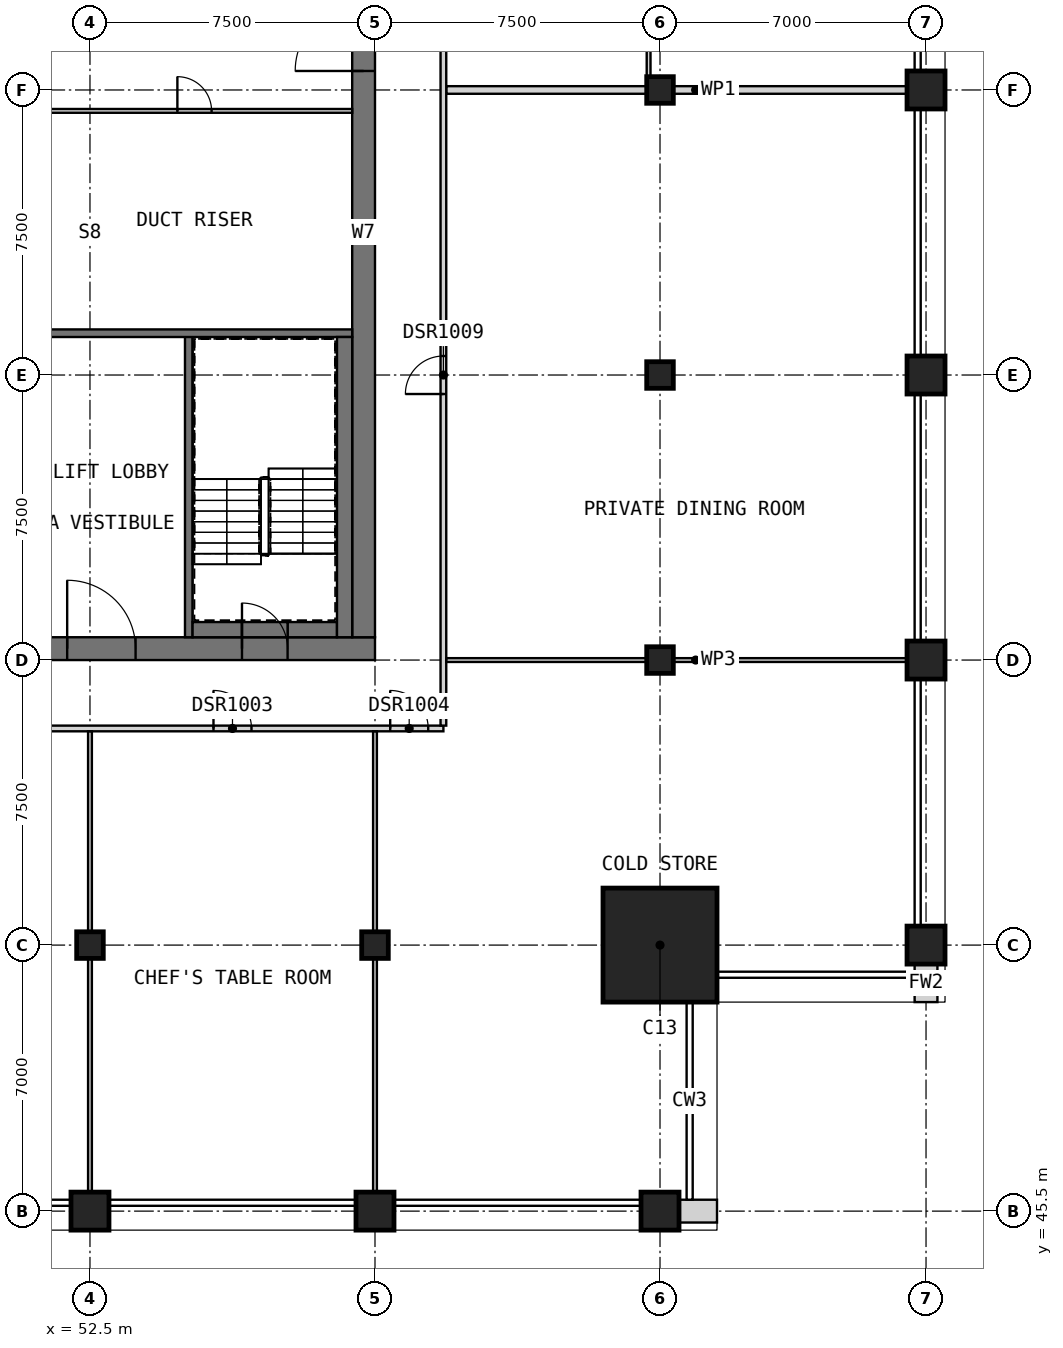
"""IFC4 building model, lengths in metres.
Left out: names, types, materials, properties, quantities, classifications, styles, units other than length and angle.
Written with IfcOpenShell. Run it as: python <this file> out.ifc"""

import sys

from ifc_helpers import new_model, si_unit, direction, frame, frame_2d, origin, origin_2d, place, context, subcontext, project, spatial, rectangle, extrude, element, fill, save


model = new_model("IFC4")
c1 = context("Model", 3, precision=1e-05, world=origin(), true_north=direction((0.0, 1.0)))
c2 = subcontext(c1, "Body", "Model", "MODEL_VIEW")
j1 = project(units=[si_unit("LENGTHUNIT", "METRE"), si_unit("PLANEANGLEUNIT", "RADIAN")], contexts=[c1])
p1 = place(None, origin())
s1 = spatial("IfcSite", under=j1, at=p1, CompositionType="ELEMENT")
p2 = place(p1, origin())
s2 = spatial("IfcBuilding", under=s1, at=p2, CompositionType="ELEMENT")
p3 = place(p2, frame((0.0, 0.0, 292.2)))
s3 = spatial("IfcBuildingStorey", under=s2, at=p3, CompositionType="ELEMENT", Elevation=292.2)
p4 = place(p3, frame((52.5, 45.5, 0.0), z_axis=(0.0, 0.0, 1.0), x_axis=(1.0, 0.0, 0.0)))
e1 = element("IfcColumn", 1, at=p4, inside=s3, PredefinedType="COLUMN", context=c2, shape_type="SweptSolid", body=[
    extrude(rectangle(XDim=1.0, YDim=1.0, at=origin_2d()), origin(), (0.0, 0.0, 1.0), 5.5),
])
p5 = place(p3, frame((52.5, 52.5, 0.0), z_axis=(0.0, 0.0, 1.0), x_axis=(1.0, 0.0, 0.0)))
e2 = element("IfcColumn", 2, at=p5, inside=s3, PredefinedType="COLUMN", context=c2, shape_type="SweptSolid", body=[
    extrude(rectangle(XDim=0.7, YDim=0.7, at=origin_2d()), origin(), (0.0, 0.0, 1.0), 5.5),
])
p6 = place(p3, frame((60.0, 45.5, 0.0), z_axis=(0.0, 0.0, 1.0), x_axis=(1.0, 0.0, 0.0)))
e3 = element("IfcColumn", 3, at=p6, inside=s3, PredefinedType="COLUMN", context=c2, shape_type="SweptSolid", body=[
    extrude(rectangle(XDim=1.0, YDim=1.0, at=origin_2d()), origin(), (0.0, 0.0, 1.0), 5.5),
])
p7 = place(p3, frame((60.0, 52.5, 0.0), z_axis=(0.0, 0.0, 1.0), x_axis=(1.0, 0.0, 0.0)))
e4 = element("IfcColumn", 4, at=p7, inside=s3, PredefinedType="COLUMN", context=c2, shape_type="SweptSolid", body=[
    extrude(rectangle(XDim=0.7, YDim=0.7, at=origin_2d()), origin(), (0.0, 0.0, 1.0), 5.5),
])
p8 = place(p3, frame((67.5, 45.5, 0.0), z_axis=(0.0, 0.0, 1.0), x_axis=(1.0, 0.0, 0.0)))
e5 = element("IfcColumn", 5, at=p8, inside=s3, PredefinedType="COLUMN", context=c2, shape_type="SweptSolid", body=[
    extrude(rectangle(XDim=1.0, YDim=1.0, at=origin_2d()), origin(), (0.0, 0.0, 1.0), 5.5),
])
for number, where, z_axis, x_axis in (
    (6, (67.5, 60.0, 0.0), (0.0, 0.0, 1.0), (1.0, 0.0, 0.0)),
    (7, (67.5, 67.5, 0.0), (0.0, 0.0, 1.0), (1.0, 0.0, 0.0)),
    (8, (67.5, 75.0, 0.0), (0.0, 0.0, 1.0), (1.0, 0.0, 0.0)),
):
    element("IfcColumn", number, at=place(p3, frame(where, z_axis=z_axis, x_axis=x_axis)), inside=s3, PredefinedType="COLUMN", context=c2, shape_type="SweptSolid", body=[
        extrude(rectangle(XDim=0.7, YDim=0.7, at=origin_2d()), origin(), (0.0, 0.0, 1.0), 5.5),
    ])
for number, where, z_axis, x_axis in (
    (9, (74.5, 52.5, 0.0), (0.0, 0.0, 1.0), (1.0, 0.0, 0.0)),
    (10, (74.5, 60.0, 0.0), (0.0, 0.0, 1.0), (1.0, 0.0, 0.0)),
    (11, (74.5, 67.5, 0.0), (0.0, 0.0, 1.0), (1.0, 0.0, 0.0)),
    (12, (74.5, 75.0, 0.0), (0.0, 0.0, 1.0), (1.0, 0.0, 0.0)),
):
    element("IfcColumn", number, at=place(p3, frame(where, z_axis=z_axis, x_axis=x_axis)), inside=s3, PredefinedType="COLUMN", context=c2, shape_type="SweptSolid", body=[
        extrude(rectangle(XDim=1.0, YDim=1.0, at=origin_2d()), origin(), (0.0, 0.0, 1.0), 5.5),
    ])
p9 = place(p3, frame((67.5, 52.5, 0.0), z_axis=(0.0, 0.0, 1.0), x_axis=(1.0, 0.0, 0.0)))
e13 = element("IfcColumn", 13, at=p9, inside=s3, PredefinedType="COLUMN", context=c2, shape_type="SweptSolid", body=[
    extrude(rectangle(XDim=3.0, YDim=3.0, at=origin_2d()), origin(), (0.0, 0.0, 1.0), 5.5),
])
p10 = place(p3, frame((30.0, 60.3, 0.0), z_axis=(0.0, 0.0, 1.0), x_axis=(1.0, 0.0, 0.0)))
e14 = element("IfcWall", 14, at=p10, inside=s3, PredefinedType="SHEAR", context=c2, shape_type="SweptSolid", body=[
    extrude(rectangle(XDim=30.0, YDim=0.6, at=frame_2d((15.0, 0.0))), origin(), (0.0, 0.0, 1.0), 5.5),
])
p11 = place(p10, frame((21.9, 0.0, 0.0)))
e15 = element("IfcOpeningElement", 15, at=p11, cuts=e14, PredefinedType="OPENING", context=c2, shape_type="SweptSolid", body=[
    extrude(rectangle(XDim=1.8, YDim=2.1, at=frame_2d((0.9, 1.05))), frame((0.0, 0.31, 0.0), z_axis=(0.0, -1.0, 0.0), x_axis=(1.0, 0.0, 0.0)), (0.0, 0.0, 1.0), 0.62),
])
p12 = place(p10, frame((26.5, 0.0, 0.0)))
e16 = element("IfcOpeningElement", 16, at=p12, cuts=e14, PredefinedType="OPENING", context=c2, shape_type="SweptSolid", body=[
    extrude(rectangle(XDim=1.2, YDim=2.1, at=frame_2d((0.6, 1.05))), frame((0.0, 0.31, 0.0), z_axis=(0.0, -1.0, 0.0), x_axis=(1.0, 0.0, 0.0)), (0.0, 0.0, 1.0), 0.62),
])
p13 = place(p3, frame((59.7, 60.6, 0.0), z_axis=(0.0, 0.0, 1.0), x_axis=(0.0, 1.0, 0.0)))
e17 = element("IfcWall", 17, at=p13, inside=s3, PredefinedType="SHEAR", context=c2, shape_type="SweptSolid", body=[
    extrude(rectangle(XDim=21.3, YDim=0.6, at=frame_2d((10.65, 0.0))), origin(), (0.0, 0.0, 1.0), 5.5),
])
p14 = place(p13, frame((14.9, 0.0, 0.0)))
e18 = element("IfcOpeningElement", 18, at=p14, cuts=e17, PredefinedType="OPENING", context=c2, shape_type="SweptSolid", body=[
    extrude(rectangle(XDim=1.8, YDim=2.1, at=frame_2d((0.9, 1.05))), frame((0.0, 0.31, 0.0), z_axis=(0.0, -1.0, 0.0), x_axis=(1.0, 0.0, 0.0)), (0.0, 0.0, 1.0), 0.62),
])
for number, where, z_axis, x_axis in (
    (19, (68.0, 45.5, 0.0), (0.0, 0.0, 1.0), (1.0, 0.0, 0.0)),
    (20, (74.5, 51.0, 0.0), (0.0, 0.0, 1.0), (0.0, 1.0, 0.0)),
):
    element("IfcWall", number, at=place(p3, frame(where, z_axis=z_axis, x_axis=x_axis)), inside=s3, PredefinedType="SOLIDWALL", context=c2, shape_type="SweptSolid", body=[
        extrude(rectangle(XDim=1.0, YDim=0.6, at=frame_2d((0.5, 0.0))), origin(), (0.0, 0.0, 1.0), 5.2),
    ])
p15 = place(p3, frame((55.1, 60.6, 0.0), z_axis=(0.0, 0.0, 1.0), x_axis=(0.0, 1.0, 0.0)))
e21 = element("IfcWall", 21, at=p15, inside=s3, PredefinedType="SOLIDWALL", context=c2, shape_type="SweptSolid", body=[
    extrude(rectangle(XDim=8.0, YDim=0.2, at=frame_2d((4.0, 0.0))), origin(), (0.0, 0.0, 1.0), 5.2),
])
p16 = place(p3, frame((51.1, 68.6, 0.0), z_axis=(0.0, 0.0, 1.0), x_axis=(1.0, 0.0, 0.0)))
e22 = element("IfcWall", 22, at=p16, inside=s3, PredefinedType="SOLIDWALL", context=c2, shape_type="SweptSolid", body=[
    extrude(rectangle(XDim=8.3, YDim=0.2, at=frame_2d((4.15, 0.0))), origin(), (0.0, 0.0, 1.0), 5.2),
])
for number, where, z_axis, x_axis in (
    (23, (55.2, 60.8, 0.0), (0.0, 0.0, 1.0), (1.0, 0.0, 0.0)),
    (24, (57.7, 60.8, 0.0), (0.0, 0.0, 1.0), (1.0, 0.0, 0.0)),
):
    element("IfcWall", number, at=place(p3, frame(where, z_axis=z_axis, x_axis=x_axis)), inside=s3, PredefinedType="SOLIDWALL", context=c2, shape_type="SweptSolid", body=[
        extrude(rectangle(XDim=1.3, YDim=0.4, at=frame_2d((0.65, 0.0))), origin(), (0.0, 0.0, 1.0), 5.2),
    ])
p17 = place(p3, frame((59.2, 60.6, 0.0), z_axis=(0.0, 0.0, 1.0), x_axis=(0.0, 1.0, 0.0)))
e25 = element("IfcWall", 25, at=p17, inside=s3, PredefinedType="SOLIDWALL", context=c2, shape_type="SweptSolid", body=[
    extrude(rectangle(XDim=7.9, YDim=0.4, at=frame_2d((3.95, 0.0))), origin(), (0.0, 0.0, 1.0), 5.2),
])
p18 = place(p3, frame((56.5, 60.8, 3.2), z_axis=(0.0, 0.0, 1.0), x_axis=(1.0, 0.0, 0.0)))
e26 = element("IfcWall", 26, at=p18, inside=s3, PredefinedType="SOLIDWALL", context=c2, shape_type="SweptSolid", body=[
    extrude(rectangle(XDim=1.2, YDim=0.4, at=frame_2d((0.6, 0.0))), origin(), (0.0, 0.0, 1.0), 2.0),
])
p19 = place(p3, frame((51.1, 74.45, 0.0), z_axis=(0.0, 0.0, 1.0), x_axis=(1.0, 0.0, 0.0)))
e27 = element("IfcWall", 27, at=p19, inside=s3, PredefinedType="PARTITIONING", context=c2, shape_type="SweptSolid", body=[
    extrude(rectangle(XDim=8.3, YDim=0.1, at=frame_2d((4.15, 0.0))), origin(), (0.0, 0.0, 1.0), 5.2),
])
p20 = place(p19, frame((3.7, 0.0, 0.0)))
e28 = element("IfcOpeningElement", 28, at=p20, cuts=e27, PredefinedType="OPENING", context=c2, shape_type="SweptSolid", body=[
    extrude(rectangle(XDim=0.9, YDim=2.1, at=frame_2d((0.45, 1.05))), frame((0.0, 0.06, 0.0), z_axis=(0.0, -1.0, 0.0), x_axis=(1.0, 0.0, 0.0)), (0.0, 0.0, 1.0), 0.12),
])
p21 = place(p3, frame((61.875, 75.0, 0.0), z_axis=(0.0, 0.0, 1.0), x_axis=(1.0, 0.0, 0.0)))
e29 = element("IfcWall", 29, at=p21, inside=s3, PredefinedType="PARTITIONING", context=c2, shape_type="SweptSolid", body=[
    extrude(rectangle(XDim=13.125, YDim=0.2, at=frame_2d((6.562, 0.0))), origin(), (0.0, 0.0, 1.0), 5.2),
])
p22 = place(p3, frame((33.75, 58.2, 0.0), z_axis=(0.0, 0.0, 1.0), x_axis=(1.0, 0.0, 0.0)))
e30 = element("IfcWall", 30, at=p22, inside=s3, PredefinedType="PARTITIONING", context=c2, shape_type="SweptSolid", body=[
    extrude(rectangle(XDim=28.05, YDim=0.15, at=frame_2d((14.025, 0.0))), origin(), (0.0, 0.0, 1.0), 5.2),
])
p23 = place(p22, frame((8.475, 0.0, 0.0)))
e31 = element("IfcOpeningElement", 31, at=p23, cuts=e30, PredefinedType="OPENING", context=c2, shape_type="SweptSolid", body=[
    extrude(rectangle(XDim=1.8, YDim=2.1, at=frame_2d((0.9, 1.05))), frame((0.0, 0.085, 0.0), z_axis=(0.0, -1.0, 0.0), x_axis=(1.0, 0.0, 0.0)), (0.0, 0.0, 1.0), 0.17),
])
p24 = place(p22, frame((22.0, 0.0, 0.0)))
e32 = element("IfcOpeningElement", 32, at=p24, cuts=e30, PredefinedType="OPENING", context=c2, shape_type="SweptSolid", body=[
    extrude(rectangle(XDim=1.0, YDim=2.1, at=frame_2d((0.5, 1.05))), frame((0.0, 0.085, 0.0), z_axis=(0.0, -1.0, 0.0), x_axis=(1.0, 0.0, 0.0)), (0.0, 0.0, 1.0), 0.17),
])
p25 = place(p22, frame((26.65, 0.0, 0.0)))
e33 = element("IfcOpeningElement", 33, at=p25, cuts=e30, PredefinedType="OPENING", context=c2, shape_type="SweptSolid", body=[
    extrude(rectangle(XDim=1.0, YDim=2.1, at=frame_2d((0.5, 1.05))), frame((0.0, 0.085, 0.0), z_axis=(0.0, -1.0, 0.0), x_axis=(1.0, 0.0, 0.0)), (0.0, 0.0, 1.0), 0.17),
])
p26 = place(p3, frame((61.8, 58.275, 0.0), z_axis=(0.0, 0.0, 1.0), x_axis=(0.0, 1.0, 0.0)))
e34 = element("IfcWall", 34, at=p26, inside=s3, PredefinedType="PARTITIONING", context=c2, shape_type="SweptSolid", body=[
    extrude(rectangle(XDim=25.95, YDim=0.15, at=frame_2d((12.975, 0.0))), origin(), (0.0, 0.0, 1.0), 5.2),
])
p27 = place(p26, frame((8.725, 0.0, 0.0)))
e35 = element("IfcOpeningElement", 35, at=p27, cuts=e34, PredefinedType="OPENING", context=c2, shape_type="SweptSolid", body=[
    extrude(rectangle(XDim=1.0, YDim=2.1, at=frame_2d((0.5, 1.05))), frame((0.0, 0.085, 0.0), z_axis=(0.0, -1.0, 0.0), x_axis=(1.0, 0.0, 0.0)), (0.0, 0.0, 1.0), 0.17),
])
p28 = place(p26, frame((18.15, 0.0, 0.0)))
e36 = element("IfcOpeningElement", 36, at=p28, cuts=e34, PredefinedType="OPENING", context=c2, shape_type="SweptSolid", body=[
    extrude(rectangle(XDim=0.9, YDim=2.1, at=frame_2d((0.45, 1.05))), frame((0.0, 0.085, 0.0), z_axis=(0.0, -1.0, 0.0), x_axis=(1.0, 0.0, 0.0)), (0.0, 0.0, 1.0), 0.17),
])
for number, where, z_axis, x_axis in (
    (37, (61.875, 60.0, 0.0), (0.0, 0.0, 1.0), (1.0, 0.0, 0.0)),
    (38, (52.5, 45.0, 0.0), (0.0, 0.0, 1.0), (0.0, 1.0, 0.0)),
    (39, (60.0, 45.0, 0.0), (0.0, 0.0, 1.0), (0.0, 1.0, 0.0)),
):
    element("IfcWall", number, at=place(p3, frame(where, z_axis=z_axis, x_axis=x_axis)), inside=s3, PredefinedType="PARTITIONING", context=c2, shape_type="SweptSolid", body=[
        extrude(rectangle(XDim=13.125, YDim=0.1, at=frame_2d((6.562, 0.0))), origin(), (0.0, 0.0, 1.0), 5.2),
    ])
p29 = place(p3, frame((67.2, 75.1, 0.0), z_axis=(0.0, 0.0, 1.0), x_axis=(0.0, 1.0, 0.0)))
e40 = element("IfcWall", 40, at=p29, inside=s3, PredefinedType="PARTITIONING", context=c2, shape_type="SweptSolid", body=[
    extrude(rectangle(XDim=3.587, YDim=0.1, at=frame_2d((1.794, 0.0))), origin(), (0.0, 0.0, 1.0), 5.2),
])
p30 = place(p29, frame((1.325, 0.0, 0.0)))
e41 = element("IfcOpeningElement", 41, at=p30, cuts=e40, PredefinedType="OPENING", context=c2, shape_type="SweptSolid", body=[
    extrude(rectangle(XDim=0.9, YDim=2.1, at=frame_2d((0.45, 1.05))), frame((0.0, 0.06, 0.0), z_axis=(0.0, -1.0, 0.0), x_axis=(1.0, 0.0, 0.0)), (0.0, 0.0, 1.0), 0.12),
])
p31 = place(p11, origin())
e42 = element("IfcDoor", 42, at=p31, inside=s3, OperationType="DOUBLE_DOOR_SINGLE_SWING", PredefinedType="DOOR", context=c2, shape_type="SweptSolid", body=[
    extrude(rectangle(XDim=1.8, YDim=2.1, at=frame_2d((0.9, 1.05))), frame((0.0, 0.025, 0.0), z_axis=(0.0, -1.0, 0.0), x_axis=(1.0, 0.0, 0.0)), (0.0, 0.0, 1.0), 0.05),
])
fill(e15, e42)
p32 = place(p14, origin())
e43 = element("IfcDoor", 43, at=p32, inside=s3, OperationType="DOUBLE_DOOR_SINGLE_SWING", PredefinedType="DOOR", context=c2, shape_type="SweptSolid", body=[
    extrude(rectangle(XDim=1.8, YDim=2.1, at=frame_2d((0.9, 1.05))), frame((0.0, 0.025, 0.0), z_axis=(0.0, -1.0, 0.0), x_axis=(1.0, 0.0, 0.0)), (0.0, 0.0, 1.0), 0.05),
])
fill(e18, e43)
p33 = place(p12, origin())
e44 = element("IfcDoor", 44, at=p33, inside=s3, OperationType="SINGLE_SWING_LEFT", PredefinedType="DOOR", context=c2, shape_type="SweptSolid", body=[
    extrude(rectangle(XDim=1.2, YDim=2.1, at=frame_2d((0.6, 1.05))), frame((0.0, 0.025, 0.0), z_axis=(0.0, -1.0, 0.0), x_axis=(1.0, 0.0, 0.0)), (0.0, 0.0, 1.0), 0.05),
])
fill(e16, e44)
p34 = place(p20, origin())
e45 = element("IfcDoor", 45, at=p34, inside=s3, OperationType="SINGLE_SWING_LEFT", PredefinedType="DOOR", context=c2, shape_type="SweptSolid", body=[
    extrude(rectangle(XDim=0.9, YDim=2.1, at=frame_2d((0.45, 1.05))), frame((0.0, 0.025, 0.0), z_axis=(0.0, -1.0, 0.0), x_axis=(1.0, 0.0, 0.0)), (0.0, 0.0, 1.0), 0.05),
])
fill(e28, e45)
p35 = place(p24, origin())
e46 = element("IfcDoor", 46, at=p35, inside=s3, OperationType="SINGLE_SWING_RIGHT", PredefinedType="DOOR", context=c2, shape_type="SweptSolid", body=[
    extrude(rectangle(XDim=1.0, YDim=2.1, at=frame_2d((0.5, 1.05))), frame((0.0, 0.025, 0.0), z_axis=(0.0, -1.0, 0.0), x_axis=(1.0, 0.0, 0.0)), (0.0, 0.0, 1.0), 0.05),
])
fill(e32, e46)
p36 = place(p25, origin())
e47 = element("IfcDoor", 47, at=p36, inside=s3, OperationType="SINGLE_SWING_RIGHT", PredefinedType="DOOR", context=c2, shape_type="SweptSolid", body=[
    extrude(rectangle(XDim=1.0, YDim=2.1, at=frame_2d((0.5, 1.05))), frame((0.0, 0.025, 0.0), z_axis=(0.0, -1.0, 0.0), x_axis=(1.0, 0.0, 0.0)), (0.0, 0.0, 1.0), 0.05),
])
fill(e33, e47)
p37 = place(p27, origin())
e48 = element("IfcDoor", 48, at=p37, inside=s3, OperationType="SINGLE_SWING_RIGHT", PredefinedType="DOOR", context=c2, shape_type="SweptSolid", body=[
    extrude(rectangle(XDim=1.0, YDim=2.1, at=frame_2d((0.5, 1.05))), frame((0.0, 0.025, 0.0), z_axis=(0.0, -1.0, 0.0), x_axis=(1.0, 0.0, 0.0)), (0.0, 0.0, 1.0), 0.05),
])
fill(e35, e48)
save(model, sys.argv[1])
